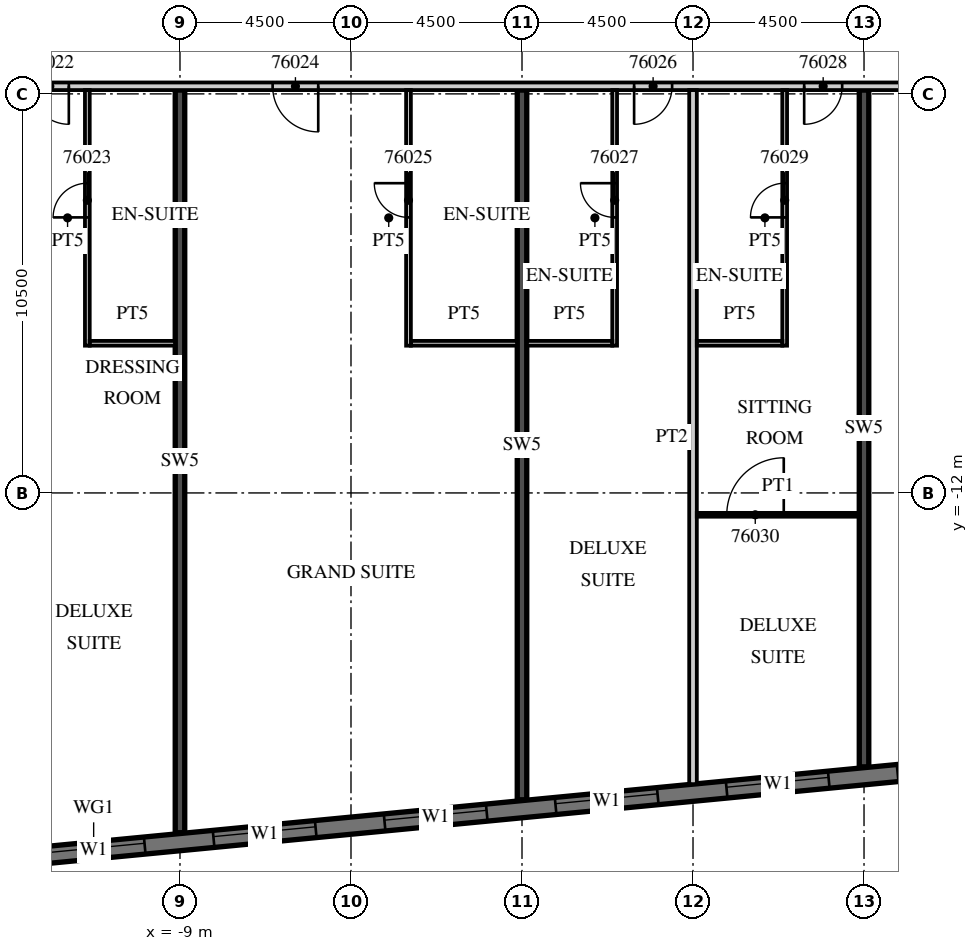
"""IFC4 building model, lengths in metres.
Left out: names, types, materials, properties, quantities, classifications, styles, units other than length and angle.
Written with IfcOpenShell. Run it as: python <this file> out.ifc"""

import sys

from ifc_helpers import new_model, si_unit, direction, frame, frame_2d, origin, place, context, subcontext, project, spatial, rectangle, extrude, element, fill, save


model = new_model("IFC4")
c1 = context("Model", 3, precision=1e-05, world=origin(), true_north=direction((0.0, 1.0)))
c2 = subcontext(c1, "Body", "Model", "MODEL_VIEW")
j1 = project(units=[si_unit("LENGTHUNIT", "METRE"), si_unit("PLANEANGLEUNIT", "RADIAN")], contexts=[c1])
p1 = place(None, origin())
s1 = spatial("IfcSite", under=j1, at=p1, CompositionType="ELEMENT")
p2 = place(p1, origin())
s2 = spatial("IfcBuilding", under=s1, at=p2, CompositionType="ELEMENT")
p3 = place(p2, frame((0.0, 0.0, 301.5)))
s3 = spatial("IfcBuildingStorey", under=s2, at=p3, CompositionType="ELEMENT", Elevation=301.5)
p4 = place(p3, frame((-9.0, -20.94, 0.0), z_axis=(0.0, 0.0, 1.0), x_axis=(0.0, 1.0, 0.0)))
e1 = element("IfcWall", 1, at=p4, inside=s3, PredefinedType="SHEAR", context=c2, shape_type="SweptSolid", body=[
    extrude(rectangle(XDim=19.541, YDim=0.25, at=frame_2d((9.77, 0.0))), origin(), (0.0, 0.0, 1.0), 3.3),
])
p5 = place(p3, frame((0.0, -20.074, 0.0), z_axis=(0.0, 0.0, 1.0), x_axis=(0.0, 1.0, 0.0)))
e2 = element("IfcWall", 2, at=p5, inside=s3, PredefinedType="SHEAR", context=c2, shape_type="SweptSolid", body=[
    extrude(rectangle(XDim=18.674, YDim=0.25, at=frame_2d((9.337, 0.0))), origin(), (0.0, 0.0, 1.0), 3.3),
])
p6 = place(p3, frame((9.0, -19.207, 0.0), z_axis=(0.0, 0.0, 1.0), x_axis=(0.0, 1.0, 0.0)))
e3 = element("IfcWall", 3, at=p6, inside=s3, PredefinedType="SHEAR", context=c2, shape_type="SweptSolid", body=[
    extrude(rectangle(XDim=17.807, YDim=0.25, at=frame_2d((8.904, 0.0))), origin(), (0.0, 0.0, 1.0), 3.3),
])
p7 = place(p3, frame((-13.521, -21.624, 0.0), z_axis=(0.0, 0.0, 1.0), x_axis=(0.995396186218, 0.095845878695, 0.0)))
e4 = element("IfcWall", 4, at=p7, inside=s3, PredefinedType="SOLIDWALL", context=c2, shape_type="SweptSolid", body=[
    extrude(rectangle(XDim=48.481, YDim=0.45, at=frame_2d((24.241, 0.0))), origin(), (0.0, 0.0, 1.0), 3.02),
])
p8 = place(p7, frame((0.91, 0.0, 0.45)))
e5 = element("IfcOpeningElement", 5, at=p8, cuts=e4, PredefinedType="OPENING", context=c2, shape_type="SweptSolid", body=[
    extrude(rectangle(XDim=2.7, YDim=2.25, at=frame_2d((1.35, 1.125))), frame((0.0, 0.235, 0.0), z_axis=(0.0, -1.0, 0.0), x_axis=(1.0, 0.0, 0.0)), (0.0, 0.0, 1.0), 0.47),
])
p9 = place(p7, frame((5.431, 0.0, 0.45)))
e6 = element("IfcOpeningElement", 6, at=p9, cuts=e4, PredefinedType="OPENING", context=c2, shape_type="SweptSolid", body=[
    extrude(rectangle(XDim=2.7, YDim=2.25, at=frame_2d((1.35, 1.125))), frame((0.0, 0.235, 0.0), z_axis=(0.0, -1.0, 0.0), x_axis=(1.0, 0.0, 0.0)), (0.0, 0.0, 1.0), 0.47),
])
p10 = place(p7, frame((9.952, 0.0, 0.45)))
e7 = element("IfcOpeningElement", 7, at=p10, cuts=e4, PredefinedType="OPENING", context=c2, shape_type="SweptSolid", body=[
    extrude(rectangle(XDim=2.7, YDim=2.25, at=frame_2d((1.35, 1.125))), frame((0.0, 0.235, 0.0), z_axis=(0.0, -1.0, 0.0), x_axis=(1.0, 0.0, 0.0)), (0.0, 0.0, 1.0), 0.47),
])
p11 = place(p7, frame((14.473, 0.0, 0.45)))
e8 = element("IfcOpeningElement", 8, at=p11, cuts=e4, PredefinedType="OPENING", context=c2, shape_type="SweptSolid", body=[
    extrude(rectangle(XDim=2.7, YDim=2.25, at=frame_2d((1.35, 1.125))), frame((0.0, 0.235, 0.0), z_axis=(0.0, -1.0, 0.0), x_axis=(1.0, 0.0, 0.0)), (0.0, 0.0, 1.0), 0.47),
])
p12 = place(p7, frame((18.994, 0.0, 0.45)))
e9 = element("IfcOpeningElement", 9, at=p12, cuts=e4, PredefinedType="OPENING", context=c2, shape_type="SweptSolid", body=[
    extrude(rectangle(XDim=2.7, YDim=2.25, at=frame_2d((1.35, 1.125))), frame((0.0, 0.235, 0.0), z_axis=(0.0, -1.0, 0.0), x_axis=(1.0, 0.0, 0.0)), (0.0, 0.0, 1.0), 0.47),
])
p13 = place(p7, frame((23.514, 0.0, 0.45)))
e10 = element("IfcOpeningElement", 10, at=p13, cuts=e4, PredefinedType="OPENING", context=c2, shape_type="SweptSolid", body=[
    extrude(rectangle(XDim=2.7, YDim=2.25, at=frame_2d((1.35, 1.125))), frame((0.0, 0.235, 0.0), z_axis=(0.0, -1.0, 0.0), x_axis=(1.0, 0.0, 0.0)), (0.0, 0.0, 1.0), 0.47),
])
p14 = place(p7, frame((28.035, 0.0, 0.45)))
e11 = element("IfcOpeningElement", 11, at=p14, cuts=e4, PredefinedType="OPENING", context=c2, shape_type="SweptSolid", body=[
    extrude(rectangle(XDim=2.7, YDim=2.25, at=frame_2d((1.35, 1.125))), frame((0.0, 0.235, 0.0), z_axis=(0.0, -1.0, 0.0), x_axis=(1.0, 0.0, 0.0)), (0.0, 0.0, 1.0), 0.47),
])
p15 = place(p7, frame((32.556, 0.0, 0.45)))
e12 = element("IfcOpeningElement", 12, at=p15, cuts=e4, PredefinedType="OPENING", context=c2, shape_type="SweptSolid", body=[
    extrude(rectangle(XDim=2.7, YDim=2.25, at=frame_2d((1.35, 1.125))), frame((0.0, 0.235, 0.0), z_axis=(0.0, -1.0, 0.0), x_axis=(1.0, 0.0, 0.0)), (0.0, 0.0, 1.0), 0.47),
])
p16 = place(p7, frame((37.077, 0.0, 0.45)))
e13 = element("IfcOpeningElement", 13, at=p16, cuts=e4, PredefinedType="OPENING", context=c2, shape_type="SweptSolid", body=[
    extrude(rectangle(XDim=2.7, YDim=2.25, at=frame_2d((1.35, 1.125))), frame((0.0, 0.235, 0.0), z_axis=(0.0, -1.0, 0.0), x_axis=(1.0, 0.0, 0.0)), (0.0, 0.0, 1.0), 0.47),
])
p17 = place(p7, frame((41.598, 0.0, 0.45)))
e14 = element("IfcOpeningElement", 14, at=p17, cuts=e4, PredefinedType="OPENING", context=c2, shape_type="SweptSolid", body=[
    extrude(rectangle(XDim=2.7, YDim=2.25, at=frame_2d((1.35, 1.125))), frame((0.0, 0.235, 0.0), z_axis=(0.0, -1.0, 0.0), x_axis=(1.0, 0.0, 0.0)), (0.0, 0.0, 1.0), 0.47),
])
p18 = place(p3, frame((-13.5, -1.3, 0.0), z_axis=(0.0, 0.0, 1.0), x_axis=(1.0, 0.0, 0.0)))
e15 = element("IfcWall", 15, at=p18, inside=s3, PredefinedType="PARTITIONING", context=c2, shape_type="SweptSolid", body=[
    extrude(rectangle(XDim=50.293, YDim=0.2, at=frame_2d((25.146, 0.0))), origin(), (0.0, 0.0, 1.0), 3.02),
])
p19 = place(p18, frame((0.575, 0.0, 0.0)))
e16 = element("IfcOpeningElement", 16, at=p19, cuts=e15, PredefinedType="OPENING", context=c2, shape_type="SweptSolid", body=[
    extrude(rectangle(XDim=1.0, YDim=2.1, at=frame_2d((0.5, 1.05))), frame((0.0, 0.11, 0.0), z_axis=(0.0, -1.0, 0.0), x_axis=(1.0, 0.0, 0.0)), (0.0, 0.0, 1.0), 0.22),
])
p20 = place(p18, frame((6.938, 0.0, 0.0)))
e17 = element("IfcOpeningElement", 17, at=p20, cuts=e15, PredefinedType="OPENING", context=c2, shape_type="SweptSolid", body=[
    extrude(rectangle(XDim=1.2, YDim=2.1, at=frame_2d((0.6, 1.05))), frame((0.0, 0.11, 0.0), z_axis=(0.0, -1.0, 0.0), x_axis=(1.0, 0.0, 0.0)), (0.0, 0.0, 1.0), 0.22),
])
p21 = place(p18, frame((16.45, 0.0, 0.0)))
e18 = element("IfcOpeningElement", 18, at=p21, cuts=e15, PredefinedType="OPENING", context=c2, shape_type="SweptSolid", body=[
    extrude(rectangle(XDim=1.0, YDim=2.1, at=frame_2d((0.5, 1.05))), frame((0.0, 0.11, 0.0), z_axis=(0.0, -1.0, 0.0), x_axis=(1.0, 0.0, 0.0)), (0.0, 0.0, 1.0), 0.22),
])
p22 = place(p18, frame((20.925, 0.0, 0.0)))
e19 = element("IfcOpeningElement", 19, at=p22, cuts=e15, PredefinedType="OPENING", context=c2, shape_type="SweptSolid", body=[
    extrude(rectangle(XDim=1.0, YDim=2.1, at=frame_2d((0.5, 1.05))), frame((0.0, 0.11, 0.0), z_axis=(0.0, -1.0, 0.0), x_axis=(1.0, 0.0, 0.0)), (0.0, 0.0, 1.0), 0.22),
])
p23 = place(p18, frame((24.938, 0.0, 0.0)))
e20 = element("IfcOpeningElement", 20, at=p23, cuts=e15, PredefinedType="OPENING", context=c2, shape_type="SweptSolid", body=[
    extrude(rectangle(XDim=1.2, YDim=2.1, at=frame_2d((0.6, 1.05))), frame((0.0, 0.11, 0.0), z_axis=(0.0, -1.0, 0.0), x_axis=(1.0, 0.0, 0.0)), (0.0, 0.0, 1.0), 0.22),
])
p24 = place(p18, frame((32.075, 0.0, 0.0)))
e21 = element("IfcOpeningElement", 21, at=p24, cuts=e15, PredefinedType="OPENING", context=c2, shape_type="SweptSolid", body=[
    extrude(rectangle(XDim=1.0, YDim=2.1, at=frame_2d((0.5, 1.05))), frame((0.0, 0.11, 0.0), z_axis=(0.0, -1.0, 0.0), x_axis=(1.0, 0.0, 0.0)), (0.0, 0.0, 1.0), 0.22),
])
p25 = place(p18, frame((38.925, 0.0, 0.0)))
e22 = element("IfcOpeningElement", 22, at=p25, cuts=e15, PredefinedType="OPENING", context=c2, shape_type="SweptSolid", body=[
    extrude(rectangle(XDim=1.0, YDim=2.1, at=frame_2d((0.5, 1.05))), frame((0.0, 0.11, 0.0), z_axis=(0.0, -1.0, 0.0), x_axis=(1.0, 0.0, 0.0)), (0.0, 0.0, 1.0), 0.22),
])
p26 = place(p18, frame((45.862, 0.0, 0.0)))
e23 = element("IfcOpeningElement", 23, at=p26, cuts=e15, PredefinedType="OPENING", context=c2, shape_type="SweptSolid", body=[
    extrude(rectangle(XDim=1.2, YDim=2.1, at=frame_2d((0.6, 1.05))), frame((0.0, 0.11, 0.0), z_axis=(0.0, -1.0, 0.0), x_axis=(1.0, 0.0, 0.0)), (0.0, 0.0, 1.0), 0.22),
])
p27 = place(p3, frame((-11.438, -8.125, 0.0), z_axis=(0.0, 0.0, 1.0), x_axis=(0.0, 1.0, 0.0)))
e24 = element("IfcWall", 24, at=p27, inside=s3, PredefinedType="PARTITIONING", context=c2, shape_type="SweptSolid", body=[
    extrude(rectangle(XDim=6.725, YDim=0.125, at=frame_2d((3.363, 0.0))), origin(), (0.0, 0.0, 1.0), 3.02),
])
p28 = place(p27, frame((3.375, 0.0, 0.0)))
e25 = element("IfcOpeningElement", 25, at=p28, cuts=e24, PredefinedType="OPENING", context=c2, shape_type="SweptSolid", body=[
    extrude(rectangle(XDim=0.9, YDim=2.1, at=frame_2d((0.45, 1.05))), frame((0.0, 0.073, 0.0), z_axis=(0.0, -1.0, 0.0), x_axis=(1.0, 0.0, 0.0)), (0.0, 0.0, 1.0), 0.145),
])
p29 = place(p3, frame((-11.375, -8.062, 0.0), z_axis=(0.0, 0.0, 1.0), x_axis=(1.0, 0.0, 0.0)))
e26 = element("IfcWall", 26, at=p29, inside=s3, PredefinedType="PARTITIONING", context=c2, shape_type="SweptSolid", body=[
    extrude(rectangle(XDim=2.25, YDim=0.125, at=frame_2d((1.125, 0.0))), origin(), (0.0, 0.0, 1.0), 3.02),
])
p30 = place(p3, frame((-2.987, -8.125, 0.0), z_axis=(0.0, 0.0, 1.0), x_axis=(0.0, 1.0, 0.0)))
e27 = element("IfcWall", 27, at=p30, inside=s3, PredefinedType="PARTITIONING", context=c2, shape_type="SweptSolid", body=[
    extrude(rectangle(XDim=6.725, YDim=0.125, at=frame_2d((3.363, 0.0))), origin(), (0.0, 0.0, 1.0), 3.02),
])
p31 = place(p30, frame((3.375, 0.0, 0.0)))
e28 = element("IfcOpeningElement", 28, at=p31, cuts=e27, PredefinedType="OPENING", context=c2, shape_type="SweptSolid", body=[
    extrude(rectangle(XDim=0.9, YDim=2.1, at=frame_2d((0.45, 1.05))), frame((0.0, 0.073, 0.0), z_axis=(0.0, -1.0, 0.0), x_axis=(1.0, 0.0, 0.0)), (0.0, 0.0, 1.0), 0.145),
])
p32 = place(p3, frame((-2.925, -8.062, 0.0), z_axis=(0.0, 0.0, 1.0), x_axis=(1.0, 0.0, 0.0)))
e29 = element("IfcWall", 29, at=p32, inside=s3, PredefinedType="PARTITIONING", context=c2, shape_type="SweptSolid", body=[
    extrude(rectangle(XDim=2.8, YDim=0.125, at=frame_2d((1.4, 0.0))), origin(), (0.0, 0.0, 1.0), 3.02),
])
p33 = place(p3, frame((4.5, -19.663, 0.0), z_axis=(0.0, 0.0, 1.0), x_axis=(0.0, 1.0, 0.0)))
e30 = element("IfcWall", 30, at=p33, inside=s3, PredefinedType="PARTITIONING", context=c2, shape_type="SweptSolid", body=[
    extrude(rectangle(XDim=18.263, YDim=0.2, at=frame_2d((9.132, 0.0))), origin(), (0.0, 0.0, 1.0), 3.02),
])
p34 = place(p3, frame((2.438, -8.125, 0.0), z_axis=(0.0, 0.0, 1.0), x_axis=(0.0, 1.0, 0.0)))
e31 = element("IfcWall", 31, at=p34, inside=s3, PredefinedType="PARTITIONING", context=c2, shape_type="SweptSolid", body=[
    extrude(rectangle(XDim=6.725, YDim=0.125, at=frame_2d((3.363, 0.0))), origin(), (0.0, 0.0, 1.0), 3.02),
])
p35 = place(p34, frame((3.375, 0.0, 0.0)))
e32 = element("IfcOpeningElement", 32, at=p35, cuts=e31, PredefinedType="OPENING", context=c2, shape_type="SweptSolid", body=[
    extrude(rectangle(XDim=0.9, YDim=2.1, at=frame_2d((0.45, 1.05))), frame((0.0, 0.073, 0.0), z_axis=(0.0, -1.0, 0.0), x_axis=(1.0, 0.0, 0.0)), (0.0, 0.0, 1.0), 0.145),
])
p36 = place(p3, frame((0.125, -8.062, 0.0), z_axis=(0.0, 0.0, 1.0), x_axis=(1.0, 0.0, 0.0)))
e33 = element("IfcWall", 33, at=p36, inside=s3, PredefinedType="PARTITIONING", context=c2, shape_type="SweptSolid", body=[
    extrude(rectangle(XDim=2.25, YDim=0.125, at=frame_2d((1.125, 0.0))), origin(), (0.0, 0.0, 1.0), 3.02),
])
p37 = place(p3, frame((6.912, -8.125, 0.0), z_axis=(0.0, 0.0, 1.0), x_axis=(0.0, 1.0, 0.0)))
e34 = element("IfcWall", 34, at=p37, inside=s3, PredefinedType="PARTITIONING", context=c2, shape_type="SweptSolid", body=[
    extrude(rectangle(XDim=6.725, YDim=0.125, at=frame_2d((3.363, 0.0))), origin(), (0.0, 0.0, 1.0), 3.02),
])
p38 = place(p37, frame((3.375, 0.0, 0.0)))
e35 = element("IfcOpeningElement", 35, at=p38, cuts=e34, PredefinedType="OPENING", context=c2, shape_type="SweptSolid", body=[
    extrude(rectangle(XDim=0.9, YDim=2.1, at=frame_2d((0.45, 1.05))), frame((0.0, 0.073, 0.0), z_axis=(0.0, -1.0, 0.0), x_axis=(1.0, 0.0, 0.0)), (0.0, 0.0, 1.0), 0.145),
])
p39 = place(p3, frame((4.6, -8.062, 0.0), z_axis=(0.0, 0.0, 1.0), x_axis=(1.0, 0.0, 0.0)))
e36 = element("IfcWall", 36, at=p39, inside=s3, PredefinedType="PARTITIONING", context=c2, shape_type="SweptSolid", body=[
    extrude(rectangle(XDim=2.25, YDim=0.125, at=frame_2d((1.125, 0.0))), origin(), (0.0, 0.0, 1.0), 3.02),
])
p40 = place(p3, frame((4.6, -12.575, 0.0), z_axis=(0.0, 0.0, 1.0), x_axis=(1.0, 0.0, 0.0)))
e37 = element("IfcWall", 37, at=p40, inside=s3, PredefinedType="PARTITIONING", context=c2, shape_type="SweptSolid", body=[
    extrude(rectangle(XDim=4.275, YDim=0.1, at=frame_2d((2.137, 0.0))), origin(), (0.0, 0.0, 1.0), 3.02),
])
p41 = place(p40, frame((0.788, 0.0, 0.0)))
e38 = element("IfcOpeningElement", 38, at=p41, cuts=e37, PredefinedType="OPENING", context=c2, shape_type="SweptSolid", body=[
    extrude(rectangle(XDim=1.5, YDim=2.1, at=frame_2d((0.75, 1.05))), frame((0.0, 0.06, 0.0), z_axis=(0.0, -1.0, 0.0), x_axis=(1.0, 0.0, 0.0)), (0.0, 0.0, 1.0), 0.12),
])
p42 = place(p8, origin())
e39 = element("IfcWindow", 39, at=p42, inside=s3, PartitioningType="SINGLE_PANEL", PredefinedType="WINDOW", context=c2, shape_type="SweptSolid", body=[
    extrude(rectangle(XDim=2.7, YDim=2.25, at=frame_2d((1.35, 1.125))), frame((0.0, 0.09, 0.0), z_axis=(0.0, -1.0, 0.0), x_axis=(1.0, 0.0, 0.0)), (0.0, 0.0, 1.0), 0.06),
])
fill(e5, e39)
p43 = place(p9, origin())
e40 = element("IfcWindow", 40, at=p43, inside=s3, PartitioningType="SINGLE_PANEL", PredefinedType="WINDOW", context=c2, shape_type="SweptSolid", body=[
    extrude(rectangle(XDim=2.7, YDim=2.25, at=frame_2d((1.35, 1.125))), frame((0.0, 0.09, 0.0), z_axis=(0.0, -1.0, 0.0), x_axis=(1.0, 0.0, 0.0)), (0.0, 0.0, 1.0), 0.06),
])
fill(e6, e40)
p44 = place(p10, origin())
e41 = element("IfcWindow", 41, at=p44, inside=s3, PartitioningType="SINGLE_PANEL", PredefinedType="WINDOW", context=c2, shape_type="SweptSolid", body=[
    extrude(rectangle(XDim=2.7, YDim=2.25, at=frame_2d((1.35, 1.125))), frame((0.0, 0.09, 0.0), z_axis=(0.0, -1.0, 0.0), x_axis=(1.0, 0.0, 0.0)), (0.0, 0.0, 1.0), 0.06),
])
fill(e7, e41)
p45 = place(p11, origin())
e42 = element("IfcWindow", 42, at=p45, inside=s3, PartitioningType="SINGLE_PANEL", PredefinedType="WINDOW", context=c2, shape_type="SweptSolid", body=[
    extrude(rectangle(XDim=2.7, YDim=2.25, at=frame_2d((1.35, 1.125))), frame((0.0, 0.09, 0.0), z_axis=(0.0, -1.0, 0.0), x_axis=(1.0, 0.0, 0.0)), (0.0, 0.0, 1.0), 0.06),
])
fill(e8, e42)
p46 = place(p12, origin())
e43 = element("IfcWindow", 43, at=p46, inside=s3, PartitioningType="SINGLE_PANEL", PredefinedType="WINDOW", context=c2, shape_type="SweptSolid", body=[
    extrude(rectangle(XDim=2.7, YDim=2.25, at=frame_2d((1.35, 1.125))), frame((0.0, 0.09, 0.0), z_axis=(0.0, -1.0, 0.0), x_axis=(1.0, 0.0, 0.0)), (0.0, 0.0, 1.0), 0.06),
])
fill(e9, e43)
p47 = place(p19, origin())
e44 = element("IfcDoor", 44, at=p47, inside=s3, OperationType="SINGLE_SWING_RIGHT", PredefinedType="DOOR", context=c2, shape_type="SweptSolid", body=[
    extrude(rectangle(XDim=1.0, YDim=2.1, at=frame_2d((0.5, 1.05))), frame((0.0, 0.025, 0.0), z_axis=(0.0, -1.0, 0.0), x_axis=(1.0, 0.0, 0.0)), (0.0, 0.0, 1.0), 0.05),
])
fill(e16, e44)
p48 = place(p28, origin())
e45 = element("IfcDoor", 45, at=p48, inside=s3, OperationType="SINGLE_SWING_LEFT", PredefinedType="DOOR", context=c2, shape_type="SweptSolid", body=[
    extrude(rectangle(XDim=0.9, YDim=2.1, at=frame_2d((0.45, 1.05))), frame((0.0, 0.025, 0.0), z_axis=(0.0, -1.0, 0.0), x_axis=(1.0, 0.0, 0.0)), (0.0, 0.0, 1.0), 0.05),
])
fill(e25, e45)
p49 = place(p20, origin())
e46 = element("IfcDoor", 46, at=p49, inside=s3, OperationType="SINGLE_SWING_RIGHT", PredefinedType="DOOR", context=c2, shape_type="SweptSolid", body=[
    extrude(rectangle(XDim=1.2, YDim=2.1, at=frame_2d((0.6, 1.05))), frame((0.0, 0.025, 0.0), z_axis=(0.0, -1.0, 0.0), x_axis=(1.0, 0.0, 0.0)), (0.0, 0.0, 1.0), 0.05),
])
fill(e17, e46)
p50 = place(p31, origin())
e47 = element("IfcDoor", 47, at=p50, inside=s3, OperationType="SINGLE_SWING_RIGHT", PredefinedType="DOOR", context=c2, shape_type="SweptSolid", body=[
    extrude(rectangle(XDim=0.9, YDim=2.1, at=frame_2d((0.45, 1.05))), frame((0.0, 0.025, 0.0), z_axis=(0.0, -1.0, 0.0), x_axis=(1.0, 0.0, 0.0)), (0.0, 0.0, 1.0), 0.05),
])
fill(e28, e47)
p51 = place(p21, origin())
e48 = element("IfcDoor", 48, at=p51, inside=s3, OperationType="SINGLE_SWING_LEFT", PredefinedType="DOOR", context=c2, shape_type="SweptSolid", body=[
    extrude(rectangle(XDim=1.0, YDim=2.1, at=frame_2d((0.5, 1.05))), frame((0.0, 0.025, 0.0), z_axis=(0.0, -1.0, 0.0), x_axis=(1.0, 0.0, 0.0)), (0.0, 0.0, 1.0), 0.05),
])
fill(e18, e48)
p52 = place(p35, origin())
e49 = element("IfcDoor", 49, at=p52, inside=s3, OperationType="SINGLE_SWING_RIGHT", PredefinedType="DOOR", context=c2, shape_type="SweptSolid", body=[
    extrude(rectangle(XDim=0.9, YDim=2.1, at=frame_2d((0.45, 1.05))), frame((0.0, 0.025, 0.0), z_axis=(0.0, -1.0, 0.0), x_axis=(1.0, 0.0, 0.0)), (0.0, 0.0, 1.0), 0.05),
])
fill(e32, e49)
p53 = place(p22, origin())
e50 = element("IfcDoor", 50, at=p53, inside=s3, OperationType="SINGLE_SWING_LEFT", PredefinedType="DOOR", context=c2, shape_type="SweptSolid", body=[
    extrude(rectangle(XDim=1.0, YDim=2.1, at=frame_2d((0.5, 1.05))), frame((0.0, 0.025, 0.0), z_axis=(0.0, -1.0, 0.0), x_axis=(1.0, 0.0, 0.0)), (0.0, 0.0, 1.0), 0.05),
])
fill(e19, e50)
p54 = place(p38, origin())
e51 = element("IfcDoor", 51, at=p54, inside=s3, OperationType="SINGLE_SWING_LEFT", PredefinedType="DOOR", context=c2, shape_type="SweptSolid", body=[
    extrude(rectangle(XDim=0.9, YDim=2.1, at=frame_2d((0.45, 1.05))), frame((0.0, 0.025, 0.0), z_axis=(0.0, -1.0, 0.0), x_axis=(1.0, 0.0, 0.0)), (0.0, 0.0, 1.0), 0.05),
])
fill(e35, e51)
p55 = place(p41, origin())
e52 = element("IfcDoor", 52, at=p55, inside=s3, OperationType="SINGLE_SWING_RIGHT", PredefinedType="DOOR", context=c2, shape_type="SweptSolid", body=[
    extrude(rectangle(XDim=1.5, YDim=2.1, at=frame_2d((0.75, 1.05))), frame((0.0, 0.025, 0.0), z_axis=(0.0, -1.0, 0.0), x_axis=(1.0, 0.0, 0.0)), (0.0, 0.0, 1.0), 0.05),
])
fill(e38, e52)
save(model, sys.argv[1])
